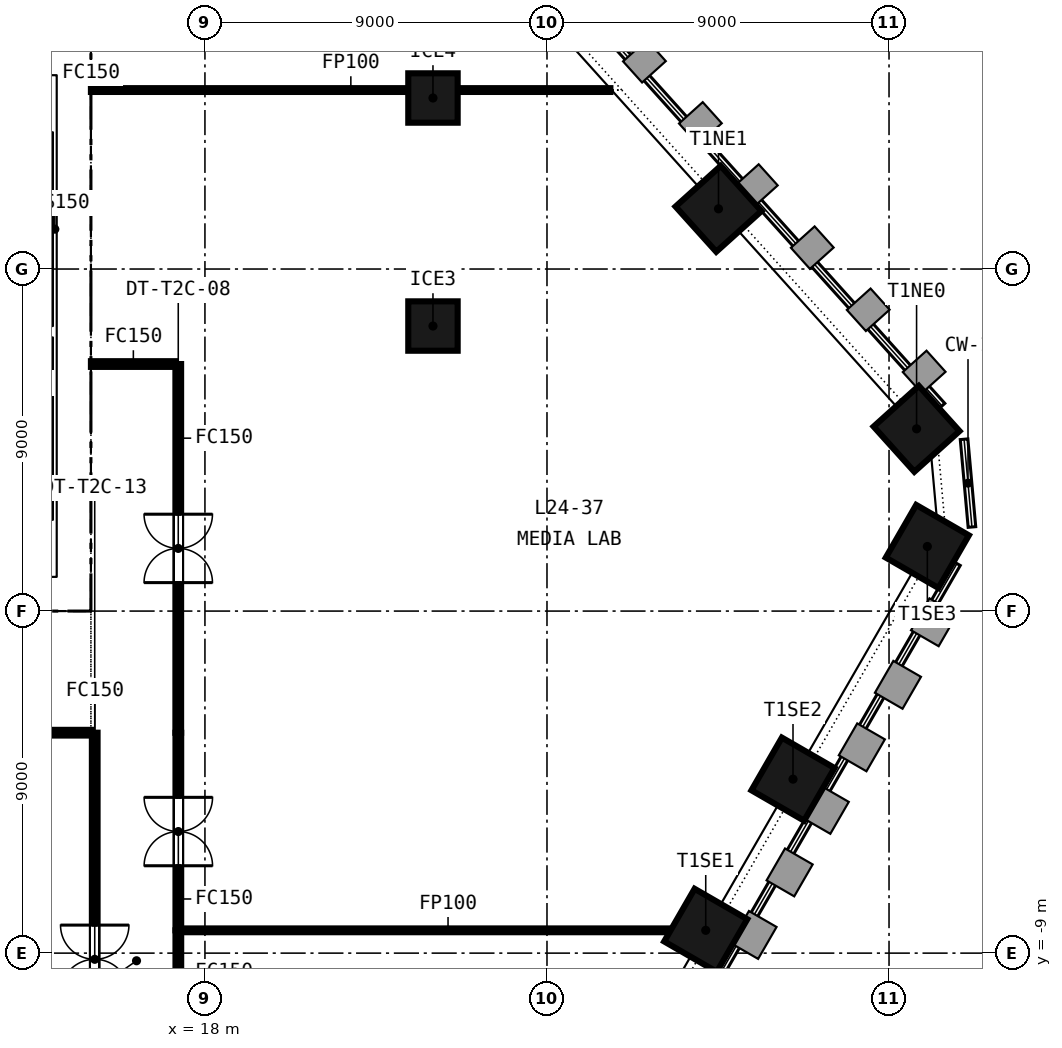
"""IFC4 building model, lengths in metres.
Left out: names, types, materials, properties, quantities, classifications, styles, units other than length and angle.
Written with IfcOpenShell. Run it as: python <this file> out.ifc"""

import sys

from ifc_helpers import new_model, si_unit, direction, frame, frame_2d, origin, origin_2d, place, context, subcontext, project, spatial, rectangle, extrude, element, fill, save


model = new_model("IFC4")
c1 = context("Model", 3, precision=1e-05, world=origin(), true_north=direction((0.0, 1.0)))
c2 = subcontext(c1, "Body", "Model", "MODEL_VIEW")
j1 = project(units=[si_unit("LENGTHUNIT", "METRE"), si_unit("PLANEANGLEUNIT", "RADIAN")], contexts=[c1])
p1 = place(None, origin())
s1 = spatial("IfcSite", under=j1, at=p1, CompositionType="ELEMENT")
p2 = place(p1, origin())
s2 = spatial("IfcBuilding", under=s1, at=p2, CompositionType="ELEMENT")
p3 = place(p2, frame((0.0, 0.0, 102.55)))
s3 = spatial("IfcBuildingStorey", under=s2, at=p3, CompositionType="ELEMENT", Elevation=102.55)
p4 = place(p3, frame((-15.0, 0.45, -0.15), z_axis=(0.0, 0.0, 1.0), x_axis=(1.0, 0.0, 0.0)))
e1 = element("IfcWall", 1, at=p4, inside=s3, PredefinedType="SOLIDWALL", context=c2, shape_type="SweptSolid", body=[
    extrude(rectangle(XDim=30.0, YDim=0.9, at=frame_2d((15.0, 0.0))), origin(), (0.0, 0.0, 1.0), 3.65),
])
p5 = place(p4, frame((5.8, 0.0, 0.15)))
e2 = element("IfcOpeningElement", 2, at=p5, cuts=e1, PredefinedType="OPENING", context=c2, shape_type="SweptSolid", body=[
    extrude(rectangle(XDim=2.4, YDim=2.4, at=frame_2d((1.2, 1.2))), frame((0.0, 0.46, 0.0), z_axis=(0.0, -1.0, 0.0), x_axis=(1.0, 0.0, 0.0)), (0.0, 0.0, 1.0), 0.92),
])
p6 = place(p4, frame((13.8, 0.0, 0.15)))
e3 = element("IfcOpeningElement", 3, at=p6, cuts=e1, PredefinedType="OPENING", context=c2, shape_type="SweptSolid", body=[
    extrude(rectangle(XDim=2.4, YDim=2.4, at=frame_2d((1.2, 1.2))), frame((0.0, 0.46, 0.0), z_axis=(0.0, -1.0, 0.0), x_axis=(1.0, 0.0, 0.0)), (0.0, 0.0, 1.0), 0.92),
])
p7 = place(p4, frame((21.8, 0.0, 0.15)))
e4 = element("IfcOpeningElement", 4, at=p7, cuts=e1, PredefinedType="OPENING", context=c2, shape_type="SweptSolid", body=[
    extrude(rectangle(XDim=2.4, YDim=2.4, at=frame_2d((1.2, 1.2))), frame((0.0, 0.46, 0.0), z_axis=(0.0, -1.0, 0.0), x_axis=(1.0, 0.0, 0.0)), (0.0, 0.0, 1.0), 0.92),
])
p8 = place(p4, frame((1.5, 0.0, 0.15)))
e5 = element("IfcOpeningElement", 5, at=p8, cuts=e1, PredefinedType="OPENING", context=c2, shape_type="SweptSolid", body=[
    extrude(rectangle(XDim=1.2, YDim=2.1, at=frame_2d((0.6, 1.05))), frame((0.0, 0.46, 0.0), z_axis=(0.0, -1.0, 0.0), x_axis=(1.0, 0.0, 0.0)), (0.0, 0.0, 1.0), 0.92),
])
p9 = place(p4, frame((27.3, 0.0, 0.15)))
e6 = element("IfcOpeningElement", 6, at=p9, cuts=e1, PredefinedType="OPENING", context=c2, shape_type="SweptSolid", body=[
    extrude(rectangle(XDim=1.2, YDim=2.1, at=frame_2d((0.6, 1.05))), frame((0.0, 0.46, 0.0), z_axis=(0.0, -1.0, 0.0), x_axis=(1.0, 0.0, 0.0)), (0.0, 0.0, 1.0), 0.92),
])
p10 = place(p3, frame((-15.0, 14.55, -0.15), z_axis=(0.0, 0.0, 1.0), x_axis=(1.0, 0.0, 0.0)))
e7 = element("IfcWall", 7, at=p10, inside=s3, PredefinedType="SOLIDWALL", context=c2, shape_type="SweptSolid", body=[
    extrude(rectangle(XDim=30.0, YDim=0.9, at=frame_2d((15.0, 0.0))), origin(), (0.0, 0.0, 1.0), 3.65),
])
p11 = place(p10, frame((9.25, 0.0, 0.15)))
e8 = element("IfcOpeningElement", 8, at=p11, cuts=e7, PredefinedType="OPENING", context=c2, shape_type="SweptSolid", body=[
    extrude(rectangle(XDim=1.5, YDim=2.1, at=frame_2d((0.75, 1.05))), frame((0.0, 0.46, 0.0), z_axis=(0.0, -1.0, 0.0), x_axis=(1.0, 0.0, 0.0)), (0.0, 0.0, 1.0), 0.92),
])
p12 = place(p10, frame((19.4, 0.0, 0.15)))
e9 = element("IfcOpeningElement", 9, at=p12, cuts=e7, PredefinedType="OPENING", context=c2, shape_type="SweptSolid", body=[
    extrude(rectangle(XDim=1.5, YDim=2.1, at=frame_2d((0.75, 1.05))), frame((0.0, 0.46, 0.0), z_axis=(0.0, -1.0, 0.0), x_axis=(1.0, 0.0, 0.0)), (0.0, 0.0, 1.0), 0.92),
])
p13 = place(p10, frame((1.5, 0.0, 0.15)))
e10 = element("IfcOpeningElement", 10, at=p13, cuts=e7, PredefinedType="OPENING", context=c2, shape_type="SweptSolid", body=[
    extrude(rectangle(XDim=1.2, YDim=2.1, at=frame_2d((0.6, 1.05))), frame((0.0, 0.46, 0.0), z_axis=(0.0, -1.0, 0.0), x_axis=(1.0, 0.0, 0.0)), (0.0, 0.0, 1.0), 0.92),
])
p14 = place(p10, frame((27.3, 0.0, 0.15)))
e11 = element("IfcOpeningElement", 11, at=p14, cuts=e7, PredefinedType="OPENING", context=c2, shape_type="SweptSolid", body=[
    extrude(rectangle(XDim=1.2, YDim=2.1, at=frame_2d((0.6, 1.05))), frame((0.0, 0.46, 0.0), z_axis=(0.0, -1.0, 0.0), x_axis=(1.0, 0.0, 0.0)), (0.0, 0.0, 1.0), 0.92),
])
p15 = place(p3, frame((14.55, 0.9, -0.15), z_axis=(0.0, 0.0, 1.0), x_axis=(0.0, 1.0, 0.0)))
e12 = element("IfcWall", 12, at=p15, inside=s3, PredefinedType="SOLIDWALL", context=c2, shape_type="SweptSolid", body=[
    extrude(rectangle(XDim=13.2, YDim=0.9, at=frame_2d((6.6, 0.0))), origin(), (0.0, 0.0, 1.0), 3.65),
])
for number, where, z_axis, x_axis in (
    (13, (31.177, -8.4, -0.15), (0.0, 0.0, 1.0), (0.5, 0.866, 0.0)),
    (14, (33.473, -4.422, -0.15), (0.0, 0.0, 1.0), (0.5, 0.866, 0.0)),
    (15, (37.008, 1.7, -0.15), (0.0, 0.0, 1.0), (0.5, 0.866, 0.0)),
    (16, (36.725, 4.795, -0.15), (0.0, 0.0, 1.0), (-0.669, 0.743, 0.0)),
    (17, (31.513, 10.584, -0.15), (0.0, 0.0, 1.0), (-0.669, 0.743, 0.0)),
):
    element("IfcColumn", number, at=place(p3, frame(where, z_axis=z_axis, x_axis=x_axis)), inside=s3, PredefinedType="COLUMN", context=c2, shape_type="SweptSolid", body=[
        extrude(rectangle(XDim=1.6, YDim=1.6, at=origin_2d()), origin(), (0.0, 0.0, 1.0), 3.65),
    ])
for number, where, z_axis, x_axis in (
    (18, (24.0, 7.5, -0.15), (0.0, 0.0, 1.0), (1.0, 0.0, 0.0)),
    (19, (24.0, 13.5, -0.15), (0.0, 0.0, 1.0), (1.0, 0.0, 0.0)),
):
    element("IfcColumn", number, at=place(p3, frame(where, z_axis=z_axis, x_axis=x_axis)), inside=s3, PredefinedType="COLUMN", context=c2, shape_type="SweptSolid", body=[
        extrude(rectangle(XDim=1.3, YDim=1.3, at=origin_2d()), origin(), (0.0, 0.0, 1.0), 3.65),
    ])
p16 = place(p3, frame((11.05, 7.35, 0.0), z_axis=(0.0, 0.0, 1.0), x_axis=(1.0, 0.0, 0.0)))
e20 = element("IfcWall", 20, at=p16, inside=s3, PredefinedType="SOLIDWALL", context=c2, shape_type="SweptSolid", body=[
    extrude(rectangle(XDim=2.95, YDim=0.3, at=frame_2d((1.475, 0.0))), origin(), (0.0, 0.0, 1.0), 3.5),
])
p17 = place(p3, frame((14.05, 0.9, 0.0), z_axis=(0.0, 0.0, 1.0), x_axis=(0.0, 1.0, 0.0)))
e21 = element("IfcWall", 21, at=p17, inside=s3, PredefinedType="SOLIDWALL", context=c2, shape_type="SweptSolid", body=[
    extrude(rectangle(XDim=13.2, YDim=0.1, at=frame_2d((6.6, 0.0))), origin(), (0.0, 0.0, 1.0), 3.5),
])
p18 = place(p3, frame((15.0, -3.2, 0.0), z_axis=(0.0, 0.0, 1.0), x_axis=(-1.0, 0.0, 0.0)))
e22 = element("IfcWall", 22, at=p18, inside=s3, PredefinedType="PARTITIONING", context=c2, shape_type="SweptSolid", body=[
    extrude(rectangle(XDim=4.787, YDim=0.15, at=frame_2d((2.394, 0.0))), origin(), (0.0, 0.0, 1.0), 2.741),
])
p19 = place(p18, frame((1.493, 0.0, 0.0)))
e23 = element("IfcOpeningElement", 23, at=p19, cuts=e22, PredefinedType="OPENING", context=c2, shape_type="SweptSolid", body=[
    extrude(rectangle(XDim=1.8, YDim=2.1, at=frame_2d((0.9, 1.05))), frame((0.0, 0.085, 0.0), z_axis=(0.0, -1.0, 0.0), x_axis=(1.0, 0.0, 0.0)), (0.0, 0.0, 1.0), 0.17),
])
p20 = place(p3, frame((17.298, 6.5, 0.0), z_axis=(0.0, 0.0, 1.0), x_axis=(0.0, -1.0, 0.0)))
e24 = element("IfcWall", 24, at=p20, inside=s3, PredefinedType="PARTITIONING", context=c2, shape_type="SweptSolid", body=[
    extrude(rectangle(XDim=9.702, YDim=0.15, at=frame_2d((4.851, 0.0))), origin(), (0.0, 0.0, 1.0), 2.741),
])
p21 = place(p20, frame((3.951, 0.0, 0.0)))
e25 = element("IfcOpeningElement", 25, at=p21, cuts=e24, PredefinedType="OPENING", context=c2, shape_type="SweptSolid", body=[
    extrude(rectangle(XDim=1.8, YDim=2.1, at=frame_2d((0.9, 1.05))), frame((0.0, 0.085, 0.0), z_axis=(0.0, -1.0, 0.0), x_axis=(1.0, 0.0, 0.0)), (0.0, 0.0, 1.0), 0.17),
])
p22 = place(p3, frame((17.3, -3.202, 0.0), z_axis=(0.0, 0.0, 1.0), x_axis=(0.0, -1.0, 0.0)))
e26 = element("IfcWall", 26, at=p22, inside=s3, PredefinedType="PARTITIONING", context=c2, shape_type="SweptSolid", body=[
    extrude(rectangle(XDim=5.198, YDim=0.15, at=frame_2d((2.599, 0.0))), origin(), (0.0, 0.0, 1.0), 2.741),
])
p23 = place(p22, frame((1.699, 0.0, 0.0)))
e27 = element("IfcOpeningElement", 27, at=p23, cuts=e26, PredefinedType="OPENING", context=c2, shape_type="SweptSolid", body=[
    extrude(rectangle(XDim=1.8, YDim=2.1, at=frame_2d((0.9, 1.05))), frame((0.0, 0.085, 0.0), z_axis=(0.0, -1.0, 0.0), x_axis=(1.0, 0.0, 0.0)), (0.0, 0.0, 1.0), 0.17),
])
p24 = place(p3, frame((17.3, -8.4, 0.0), z_axis=(0.0, 0.0, 1.0), x_axis=(0.0, -1.0, 0.0)))
e28 = element("IfcWall", 28, at=p24, inside=s3, PredefinedType="PARTITIONING", context=c2, shape_type="SweptSolid", body=[
    extrude(rectangle(XDim=5.439, YDim=0.15, at=frame_2d((2.72, 0.0))), origin(), (0.0, 0.0, 1.0), 2.741),
])
p25 = place(p24, frame((2.219, 0.0, 0.0)))
e29 = element("IfcOpeningElement", 29, at=p25, cuts=e28, PredefinedType="OPENING", context=c2, shape_type="SweptSolid", body=[
    extrude(rectangle(XDim=1.0, YDim=2.1, at=frame_2d((0.5, 1.05))), frame((0.0, 0.085, 0.0), z_axis=(0.0, -1.0, 0.0), x_axis=(1.0, 0.0, 0.0)), (0.0, 0.0, 1.0), 0.17),
])
p26 = place(p3, frame((15.0, 13.709, 0.0), z_axis=(0.0, 0.0, 1.0), x_axis=(1.0, 0.0, 0.0)))
e30 = element("IfcWall", 30, at=p26, inside=s3, PredefinedType="PARTITIONING", context=c2, shape_type="SweptSolid", body=[
    extrude(rectangle(XDim=13.668, YDim=0.1, at=frame_2d((6.834, 0.0))), origin(), (0.0, 0.0, 1.0), 2.741),
])
p27 = place(p3, frame((15.0, 6.5, 0.0), z_axis=(0.0, 0.0, 1.0), x_axis=(1.0, 0.0, 0.0)))
e31 = element("IfcWall", 31, at=p27, inside=s3, PredefinedType="PARTITIONING", context=c2, shape_type="SweptSolid", body=[
    extrude(rectangle(XDim=2.223, YDim=0.15, at=frame_2d((1.111, 0.0))), origin(), (0.0, 0.0, 1.0), 2.741),
])
p28 = place(p3, frame((17.375, -8.4, 0.0), z_axis=(0.0, 0.0, 1.0), x_axis=(1.0, 0.0, 0.0)))
e32 = element("IfcWall", 32, at=p28, inside=s3, PredefinedType="PARTITIONING", context=c2, shape_type="SweptSolid", body=[
    extrude(rectangle(XDim=14.033, YDim=0.1, at=frame_2d((7.017, 0.0))), origin(), (0.0, 0.0, 1.0), 2.741),
])
p29 = place(p3, frame((15.1, -15.125, 0.0), z_axis=(0.0, 0.0, 1.0), x_axis=(0.0, 1.0, 0.0)))
e33 = element("IfcWall", 33, at=p29, inside=s3, PredefinedType="PARTITIONING", context=c2, shape_type="SweptSolid", body=[
    extrude(rectangle(XDim=11.925, YDim=0.15, at=frame_2d((5.962, 0.0))), origin(), (0.0, 0.0, 1.0), 2.741),
])
p30 = place(p29, frame((5.062, 0.0, 0.0)))
e34 = element("IfcOpeningElement", 34, at=p30, cuts=e33, PredefinedType="OPENING", context=c2, shape_type="SweptSolid", body=[
    extrude(rectangle(XDim=1.8, YDim=2.1, at=frame_2d((0.9, 1.05))), frame((0.0, 0.085, 0.0), z_axis=(0.0, -1.0, 0.0), x_axis=(1.0, 0.0, 0.0)), (0.0, 0.0, 1.0), 0.17),
])
p31 = place(p21, origin())
e35 = element("IfcDoor", 35, at=p31, inside=s3, OperationType="DOUBLE_DOOR_DOUBLE_SWING", PredefinedType="DOOR", context=c2, shape_type="SweptSolid", body=[
    extrude(rectangle(XDim=1.8, YDim=2.1, at=frame_2d((0.9, 1.05))), frame((0.0, 0.025, 0.0), z_axis=(0.0, -1.0, 0.0), x_axis=(1.0, 0.0, 0.0)), (0.0, 0.0, 1.0), 0.05),
])
fill(e25, e35)
p32 = place(p23, origin())
e36 = element("IfcDoor", 36, at=p32, inside=s3, OperationType="DOUBLE_DOOR_DOUBLE_SWING", PredefinedType="DOOR", context=c2, shape_type="SweptSolid", body=[
    extrude(rectangle(XDim=1.8, YDim=2.1, at=frame_2d((0.9, 1.05))), frame((0.0, 0.025, 0.0), z_axis=(0.0, -1.0, 0.0), x_axis=(1.0, 0.0, 0.0)), (0.0, 0.0, 1.0), 0.05),
])
fill(e27, e36)
p33 = place(p30, origin())
e37 = element("IfcDoor", 37, at=p33, inside=s3, OperationType="DOUBLE_DOOR_DOUBLE_SWING", PredefinedType="DOOR", context=c2, shape_type="SweptSolid", body=[
    extrude(rectangle(XDim=1.8, YDim=2.1, at=frame_2d((0.9, 1.05))), frame((0.0, 0.025, 0.0), z_axis=(0.0, -1.0, 0.0), x_axis=(1.0, 0.0, 0.0)), (0.0, 0.0, 1.0), 0.05),
])
fill(e34, e37)
save(model, sys.argv[1])
